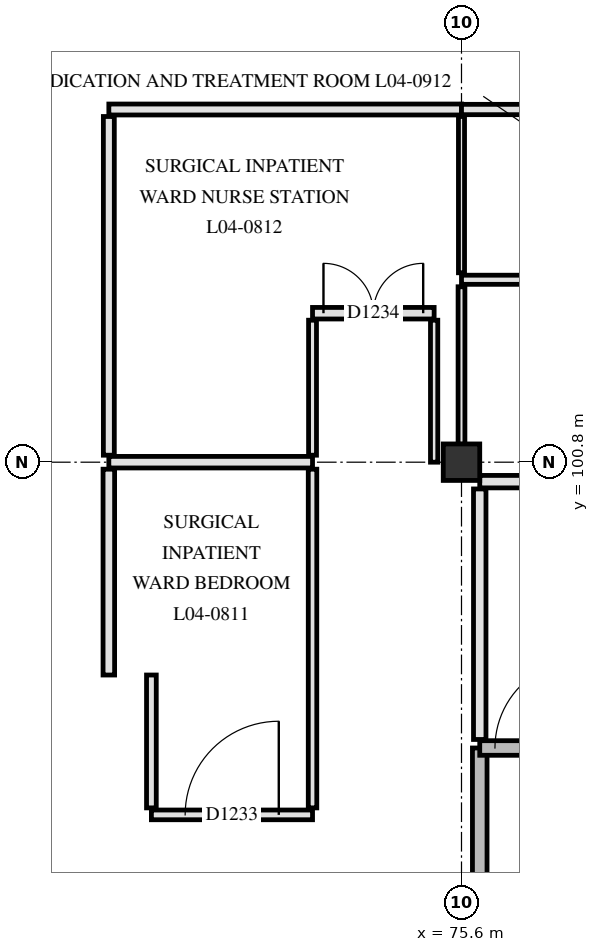
"""IFC4 building model, lengths in metres.
Left out: names, types, materials, properties, quantities, classifications, styles, units other than length and angle.
Written with IfcOpenShell. Run it as: python <this file> out.ifc"""

import sys

from ifc_helpers import new_model, si_unit, direction, frame, frame_2d, origin, origin_2d, place, context, subcontext, project, spatial, rectangle, extrude, element, fill, save


model = new_model("IFC4")
c1 = context("Model", 3, precision=1e-05, world=origin(), true_north=direction((0.0, 1.0)))
c2 = subcontext(c1, "Body", "Model", "MODEL_VIEW")
j1 = project(units=[si_unit("LENGTHUNIT", "METRE"), si_unit("PLANEANGLEUNIT", "RADIAN")], contexts=[c1])
p1 = place(None, origin())
s1 = spatial("IfcSite", under=j1, at=p1, CompositionType="ELEMENT")
p2 = place(p1, origin())
s2 = spatial("IfcBuilding", under=s1, at=p2, CompositionType="ELEMENT")
p3 = place(p2, frame((0.0, 0.0, 18.6)))
s3 = spatial("IfcBuildingStorey", under=s2, at=p3, CompositionType="ELEMENT", Elevation=18.6)
p4 = place(p3, frame((75.6, 100.8, 0.0), z_axis=(0.0, 0.0, 1.0), x_axis=(1.0, 0.0, 0.0)))
e1 = element("IfcColumn", 1, at=p4, inside=s3, PredefinedType="COLUMN", context=c2, shape_type="SweptSolid", body=[
    extrude(rectangle(XDim=0.6, YDim=0.6, at=origin_2d()), origin(), (0.0, 0.0, 1.0), 3.9),
])
p5 = place(p3, frame((75.9, 92.78, 0.0), z_axis=(0.0, 0.0, 1.0), x_axis=(0.0, 1.0, 0.0)))
e2 = element("IfcWall", 2, at=p5, inside=s3, PredefinedType="SHEAR", context=c2, shape_type="SweptSolid", body=[
    extrude(rectangle(XDim=3.32, YDim=0.24, at=frame_2d((1.66, 0.0))), origin(), (0.0, 0.0, 1.0), 3.62),
])
p6 = place(p3, frame((75.9, 96.1, 0.0), z_axis=(0.0, 0.0, 1.0), x_axis=(1.0, 0.0, 0.0)))
e3 = element("IfcWall", 3, at=p6, inside=s3, PredefinedType="SHEAR", context=c2, shape_type="SweptSolid", body=[
    extrude(rectangle(XDim=7.82, YDim=0.24, at=frame_2d((3.91, 0.0))), origin(), (0.0, 0.0, 1.0), 3.62),
])
p7 = place(p6, frame((0.25, 0.0, 0.0)))
e4 = element("IfcOpeningElement", 4, at=p7, cuts=e3, PredefinedType="OPENING", context=c2, shape_type="SweptSolid", body=[
    extrude(rectangle(XDim=1.45, YDim=2.2, at=frame_2d((0.725, 1.1))), frame((0.0, 0.13, 0.0), z_axis=(0.0, -1.0, 0.0), x_axis=(1.0, 0.0, 0.0)), (0.0, 0.0, 1.0), 0.26),
])
p8 = place(p3, frame((75.9, 96.24, 0.0), z_axis=(0.0, 0.0, 1.0), x_axis=(0.0, 1.0, 0.0)))
e5 = element("IfcWall", 5, at=p8, inside=s3, PredefinedType="PARTITIONING", context=c2, shape_type="SweptSolid", body=[
    extrude(rectangle(XDim=4.12, YDim=0.205, at=frame_2d((2.06, 0.0))), origin(), (0.0, 0.0, 1.0), 3.61),
])
p9 = place(p3, frame((75.9, 100.48, 0.0), z_axis=(0.0, 0.0, 1.0), x_axis=(1.0, 0.0, 0.0)))
e6 = element("IfcWall", 6, at=p9, inside=s3, PredefinedType="PARTITIONING", context=c2, shape_type="SweptSolid", body=[
    extrude(rectangle(XDim=4.18, YDim=0.205, at=frame_2d((2.09, 0.0))), origin(), (0.0, 0.0, 1.0), 3.61),
])
p10 = place(p9, frame((1.29, 0.0, 0.0)))
e7 = element("IfcOpeningElement", 7, at=p10, cuts=e6, PredefinedType="OPENING", context=c2, shape_type="SweptSolid", body=[
    extrude(rectangle(XDim=1.6, YDim=2.25, at=frame_2d((0.8, 1.125))), frame((0.0, 0.113, 0.0), z_axis=(0.0, -1.0, 0.0), x_axis=(1.0, 0.0, 0.0)), (0.0, 0.0, 1.0), 0.225),
])
p11 = place(p3, frame((70.5, 95.0, 0.0), z_axis=(0.0, 0.0, 1.0), x_axis=(1.0, 0.0, 0.0)))
e8 = element("IfcWall", 8, at=p11, inside=s3, PredefinedType="PARTITIONING", context=c2, shape_type="SweptSolid", body=[
    extrude(rectangle(XDim=2.65, YDim=0.16, at=frame_2d((1.325, 0.0))), origin(), (0.0, 0.0, 1.0), 3.61),
])
p12 = place(p11, frame((0.555, 0.0, 0.0)))
e9 = element("IfcOpeningElement", 9, at=p12, cuts=e8, PredefinedType="OPENING", context=c2, shape_type="SweptSolid", body=[
    extrude(rectangle(XDim=1.54, YDim=2.24, at=frame_2d((0.77, 1.12))), frame((0.0, 0.09, 0.0), z_axis=(0.0, -1.0, 0.0), x_axis=(1.0, 0.0, 0.0)), (0.0, 0.0, 1.0), 0.18),
])
p13 = place(p3, frame((69.8, 100.8, 0.0), z_axis=(0.0, 0.0, 1.0), x_axis=(1.0, 0.0, 0.0)))
e10 = element("IfcWall", 10, at=p13, inside=s3, PredefinedType="PARTITIONING", context=c2, shape_type="SweptSolid", body=[
    extrude(rectangle(XDim=3.35, YDim=0.19, at=frame_2d((1.675, 0.0))), origin(), (0.0, 0.0, 1.0), 3.16),
])
p14 = place(p3, frame((73.15, 103.25, 0.0), z_axis=(0.0, 0.0, 1.0), x_axis=(1.0, 0.0, 0.0)))
e11 = element("IfcWall", 11, at=p14, inside=s3, PredefinedType="PARTITIONING", context=c2, shape_type="SweptSolid", body=[
    extrude(rectangle(XDim=2.0, YDim=0.19, at=frame_2d((1.0, 0.0))), origin(), (0.0, 0.0, 1.0), 3.61),
])
p15 = place(p14, frame((0.18, 0.0, 0.0)))
e12 = element("IfcOpeningElement", 12, at=p15, cuts=e11, PredefinedType="OPENING", context=c2, shape_type="SweptSolid", body=[
    extrude(rectangle(XDim=1.64, YDim=2.28, at=frame_2d((0.82, 1.14))), frame((0.0, 0.105, 0.0), z_axis=(0.0, -1.0, 0.0), x_axis=(1.0, 0.0, 0.0)), (0.0, 0.0, 1.0), 0.21),
])
p16 = place(p3, frame((75.6, 103.8, 0.0), z_axis=(0.0, 0.0, 1.0), x_axis=(1.0, 0.0, 0.0)))
e13 = element("IfcWall", 13, at=p16, inside=s3, PredefinedType="PARTITIONING", context=c2, shape_type="SweptSolid", body=[
    extrude(rectangle(XDim=4.4, YDim=0.15, at=frame_2d((2.2, 0.0))), origin(), (0.0, 0.0, 1.0), 3.26),
])
p17 = place(p16, frame((1.28, 0.0, 0.0)))
e14 = element("IfcOpeningElement", 14, at=p17, cuts=e13, PredefinedType="OPENING", context=c2, shape_type="SweptSolid", body=[
    extrude(rectangle(XDim=1.84, YDim=2.28, at=frame_2d((0.92, 1.14))), frame((0.0, 0.085, 0.0), z_axis=(0.0, -1.0, 0.0), x_axis=(1.0, 0.0, 0.0)), (0.0, 0.0, 1.0), 0.17),
])
p18 = place(p3, frame((69.8, 106.6, 0.0), z_axis=(0.0, 0.0, 1.0), x_axis=(1.0, 0.0, 0.0)))
e15 = element("IfcWall", 15, at=p18, inside=s3, PredefinedType="PARTITIONING", context=c2, shape_type="SweptSolid", body=[
    extrude(rectangle(XDim=5.8, YDim=0.18, at=frame_2d((2.9, 0.0))), origin(), (0.0, 0.0, 1.0), 3.26),
])
p19 = place(p3, frame((75.6, 106.6, 0.0), z_axis=(0.0, 0.0, 1.0), x_axis=(1.0, 0.0, 0.0)))
e16 = element("IfcWall", 16, at=p19, inside=s3, PredefinedType="PARTITIONING", context=c2, shape_type="SweptSolid", body=[
    extrude(rectangle(XDim=4.4, YDim=0.17, at=frame_2d((2.2, 0.0))), origin(), (0.0, 0.0, 1.0), 3.26),
])
p20 = place(p3, frame((69.8, 97.3, 0.0), z_axis=(0.0, 0.0, 1.0), x_axis=(0.0, 1.0, 0.0)))
e17 = element("IfcWall", 17, at=p20, inside=s3, PredefinedType="PARTITIONING", context=c2, shape_type="SweptSolid", body=[
    extrude(rectangle(XDim=3.385, YDim=0.19, at=frame_2d((1.692, 0.0))), origin(), (0.0, 0.0, 1.0), 3.31),
])
p21 = place(p3, frame((69.8, 100.915, 0.0), z_axis=(0.0, 0.0, 1.0), x_axis=(0.0, 1.0, 0.0)))
e18 = element("IfcWall", 18, at=p21, inside=s3, PredefinedType="PARTITIONING", context=c2, shape_type="SweptSolid", body=[
    extrude(rectangle(XDim=5.57, YDim=0.18, at=frame_2d((2.785, 0.0))), origin(), (0.0, 0.0, 1.0), 3.31),
])
p22 = place(p3, frame((70.5, 95.115, 0.0), z_axis=(0.0, 0.0, 1.0), x_axis=(0.0, 1.0, 0.0)))
e19 = element("IfcWall", 19, at=p22, inside=s3, PredefinedType="PARTITIONING", context=c2, shape_type="SweptSolid", body=[
    extrude(rectangle(XDim=2.185, YDim=0.16, at=frame_2d((1.093, 0.0))), origin(), (0.0, 0.0, 1.0), 3.31),
])
p23 = place(p3, frame((73.15, 95.115, 0.0), z_axis=(0.0, 0.0, 1.0), x_axis=(0.0, 1.0, 0.0)))
e20 = element("IfcWall", 20, at=p23, inside=s3, PredefinedType="PARTITIONING", context=c2, shape_type="SweptSolid", body=[
    extrude(rectangle(XDim=5.57, YDim=0.14, at=frame_2d((2.785, 0.0))), origin(), (0.0, 0.0, 1.0), 3.31),
])
p24 = place(p3, frame((73.15, 100.915, 0.0), z_axis=(0.0, 0.0, 1.0), x_axis=(0.0, 1.0, 0.0)))
e21 = element("IfcWall", 21, at=p24, inside=s3, PredefinedType="PARTITIONING", context=c2, shape_type="SweptSolid", body=[
    extrude(rectangle(XDim=2.22, YDim=0.13, at=frame_2d((1.11, 0.0))), origin(), (0.0, 0.0, 1.0), 3.61),
])
p25 = place(p3, frame((75.15, 100.8, 0.0), z_axis=(0.0, 0.0, 1.0), x_axis=(0.0, 1.0, 0.0)))
e22 = element("IfcWall", 22, at=p25, inside=s3, PredefinedType="PARTITIONING", context=c2, shape_type="SweptSolid", body=[
    extrude(rectangle(XDim=2.335, YDim=0.12, at=frame_2d((1.167, 0.0))), origin(), (0.0, 0.0, 1.0), 3.16),
])
p26 = place(p3, frame((75.6, 101.095, 0.0), z_axis=(0.0, 0.0, 1.0), x_axis=(0.0, 1.0, 0.0)))
e23 = element("IfcWall", 23, at=p26, inside=s3, PredefinedType="PARTITIONING", context=c2, shape_type="SweptSolid", body=[
    extrude(rectangle(XDim=2.59, YDim=0.112, at=frame_2d((1.295, 0.0))), origin(), (0.0, 0.0, 1.0), 3.26),
])
p27 = place(p3, frame((75.6, 103.915, 0.0), z_axis=(0.0, 0.0, 1.0), x_axis=(0.0, 1.0, 0.0)))
e24 = element("IfcWall", 24, at=p27, inside=s3, PredefinedType="PARTITIONING", context=c2, shape_type="SweptSolid", body=[
    extrude(rectangle(XDim=2.57, YDim=0.1, at=frame_2d((1.285, 0.0))), origin(), (0.0, 0.0, 1.0), 3.26),
])
p28 = place(p7, origin())
e25 = element("IfcDoor", 25, at=p28, inside=s3, OperationType="SINGLE_SWING_RIGHT", PredefinedType="DOOR", context=c2, shape_type="SweptSolid", body=[
    extrude(rectangle(XDim=1.45, YDim=2.2, at=frame_2d((0.725, 1.1))), frame((0.0, 0.025, 0.0), z_axis=(0.0, -1.0, 0.0), x_axis=(1.0, 0.0, 0.0)), (0.0, 0.0, 1.0), 0.05),
])
fill(e4, e25)
p29 = place(p12, origin())
e26 = element("IfcDoor", 26, at=p29, inside=s3, OperationType="SINGLE_SWING_RIGHT", PredefinedType="DOOR", context=c2, shape_type="SweptSolid", body=[
    extrude(rectangle(XDim=1.54, YDim=2.24, at=frame_2d((0.77, 1.12))), frame((0.0, 0.025, 0.0), z_axis=(0.0, -1.0, 0.0), x_axis=(1.0, 0.0, 0.0)), (0.0, 0.0, 1.0), 0.05),
])
fill(e9, e26)
p30 = place(p15, origin())
e27 = element("IfcDoor", 27, at=p30, inside=s3, OperationType="DOUBLE_SWING_LEFT", PredefinedType="DOOR", context=c2, shape_type="SweptSolid", body=[
    extrude(rectangle(XDim=1.64, YDim=2.28, at=frame_2d((0.82, 1.14))), frame((0.0, 0.025, 0.0), z_axis=(0.0, -1.0, 0.0), x_axis=(1.0, 0.0, 0.0)), (0.0, 0.0, 1.0), 0.05),
])
fill(e12, e27)
save(model, sys.argv[1])
